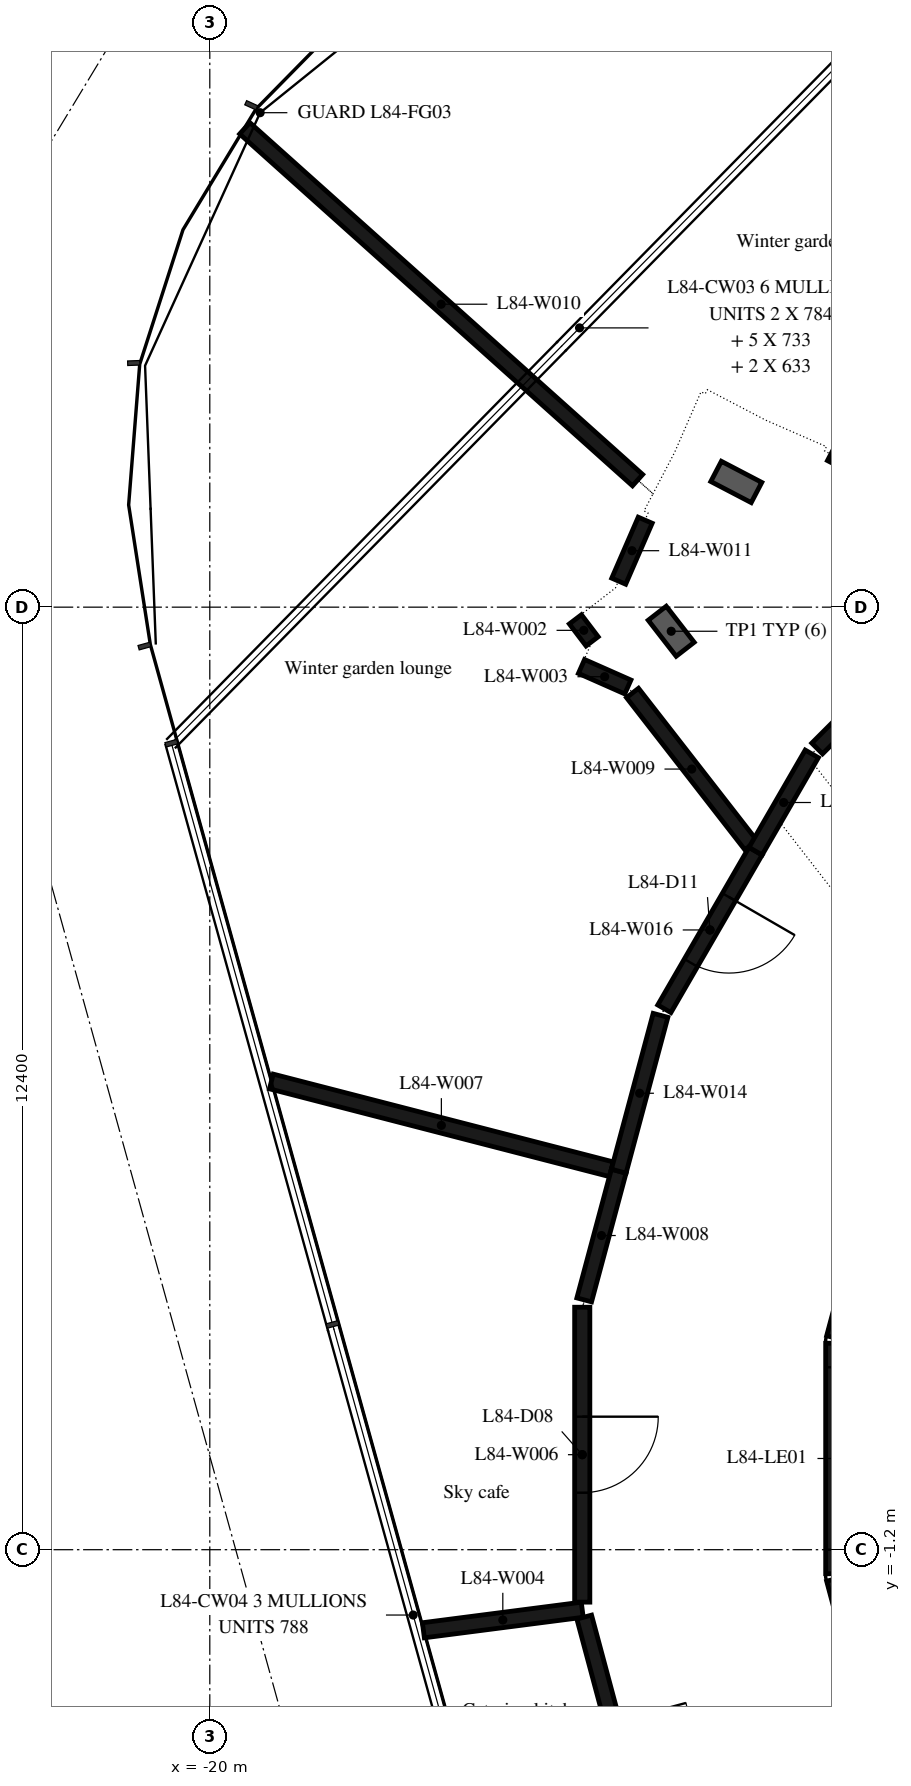
"""IFC4 building model, lengths in metres.
Left out: names, types, materials, properties, quantities, classifications, styles, units other than length and angle.
Written with IfcOpenShell. Run it as: python <this file> out.ifc"""

import sys

from ifc_helpers import new_model, si_unit, direction, frame, frame_2d, origin, place, context, subcontext, project, spatial, rectangle, extrude, element, fill, save


model = new_model("IFC4")
c1 = context("Model", 3, precision=1e-05, world=origin(), true_north=direction((0.0, 1.0)))
c2 = subcontext(c1, "Body", "Model", "MODEL_VIEW")
j1 = project(units=[si_unit("LENGTHUNIT", "METRE"), si_unit("PLANEANGLEUNIT", "RADIAN")], contexts=[c1])
p1 = place(None, origin())
s1 = spatial("IfcSite", under=j1, at=p1, CompositionType="ELEMENT")
p2 = place(p1, origin())
s2 = spatial("IfcBuilding", under=s1, at=p2, CompositionType="ELEMENT")
p3 = place(p2, frame((0.0, 0.0, 326.2)))
s3 = spatial("IfcBuildingStorey", under=s2, at=p3, CompositionType="ELEMENT", Elevation=326.2)
p4 = place(p3, frame((-10.858, 4.479, 0.0), z_axis=(0.0, 0.0, 1.0), x_axis=(-0.258734743916, -0.965948410781, 0.0)))
e1 = element("IfcWall", 1, at=p4, inside=s3, PredefinedType="SHEAR", context=c2, shape_type="SweptSolid", body=[
    extrude(rectangle(XDim=3.033, YDim=0.5, at=frame_2d((1.516, 0.0))), origin(), (0.0, 0.0, 1.0), 6.35),
])
p5 = place(p3, frame((-11.647, 1.516, 0.0), z_axis=(0.0, 0.0, 1.0), x_axis=(0.0, -1.0, 0.0)))
e2 = element("IfcWall", 2, at=p5, inside=s3, PredefinedType="SHEAR", context=c2, shape_type="SweptSolid", body=[
    extrude(rectangle(XDim=3.033, YDim=0.5, at=frame_2d((1.516, 0.0))), origin(), (0.0, 0.0, 1.0), 6.35),
])
p6 = place(p5, frame((0.316, 0.0, 0.0)))
e3 = element("IfcOpeningElement", 3, at=p6, cuts=e2, PredefinedType="OPENING", context=c2, shape_type="SweptSolid", body=[
    extrude(rectangle(XDim=2.4, YDim=2.1, at=frame_2d((1.2, 1.05))), frame((0.0, 0.26, 0.0), z_axis=(0.0, -1.0, 0.0), x_axis=(1.0, 0.0, 0.0)), (0.0, 0.0, 1.0), 0.52),
])
p7 = place(p3, frame((-11.643, -1.55, 0.0), z_axis=(0.0, 0.0, 1.0), x_axis=(0.258734743916, -0.965948410781, 0.0)))
e4 = element("IfcWall", 4, at=p7, inside=s3, PredefinedType="SHEAR", context=c2, shape_type="SweptSolid", body=[
    extrude(rectangle(XDim=3.033, YDim=0.5, at=frame_2d((1.516, 0.0))), origin(), (0.0, 0.0, 1.0), 6.35),
])
p8 = place(p7, frame((1.066, 0.0, 0.0)))
e5 = element("IfcOpeningElement", 5, at=p8, cuts=e4, PredefinedType="OPENING", context=c2, shape_type="SweptSolid", body=[
    extrude(rectangle(XDim=0.9, YDim=2.1, at=frame_2d((0.45, 1.05))), frame((0.0, 0.26, 0.0), z_axis=(0.0, -1.0, 0.0), x_axis=(1.0, 0.0, 0.0)), (0.0, 0.0, 1.0), 0.52),
])
p9 = place(p3, frame((-15.19, 11.04, 0.0), z_axis=(0.0, 0.0, 1.0), x_axis=(0.604283722932, -0.796769215143, 0.0)))
e6 = element("IfcWall", 6, at=p9, inside=s3, PredefinedType="PARTITIONING", context=c2, shape_type="SweptSolid", body=[
    extrude(rectangle(XDim=0.364, YDim=0.2, at=frame_2d((0.182, 0.0))), origin(), (0.0, 0.0, 1.0), 6.35),
])
p10 = place(p3, frame((-15.11, 10.42, 0.0), z_axis=(0.0, 0.0, 1.0), x_axis=(0.914444201394, -0.404711999497, 0.0)))
e7 = element("IfcWall", 7, at=p10, inside=s3, PredefinedType="PARTITIONING", context=c2, shape_type="SweptSolid", body=[
    extrude(rectangle(XDim=0.667, YDim=0.2, at=frame_2d((0.333, 0.0))), origin(), (0.0, 0.0, 1.0), 6.35),
])
p11 = place(p3, frame((-15.1, -1.99, 0.0), z_axis=(0.0, 0.0, 1.0), x_axis=(-0.991756032237, -0.128140440614, 0.0)))
e8 = element("IfcWall", 8, at=p11, inside=s3, PredefinedType="PARTITIONING", context=c2, shape_type="SweptSolid", body=[
    extrude(rectangle(XDim=2.107, YDim=0.2, at=frame_2d((1.054, 0.0))), origin(), (0.0, 0.0, 1.0), 6.35),
])
p12 = place(p3, frame((-15.074, -2.087, 0.0), z_axis=(0.0, 0.0, 1.0), x_axis=(0.259026804199, -0.965870133458, 0.0)))
e9 = element("IfcWall", 9, at=p12, inside=s3, PredefinedType="PARTITIONING", context=c2, shape_type="SweptSolid", body=[
    extrude(rectangle(XDim=3.876, YDim=0.2, at=frame_2d((1.938, 0.0))), origin(), (0.0, 0.0, 1.0), 6.35),
])
p13 = place(p12, frame((1.438, 0.0, 0.0)))
e10 = element("IfcOpeningElement", 10, at=p13, cuts=e9, PredefinedType="OPENING", context=c2, shape_type="SweptSolid", body=[
    extrude(rectangle(XDim=1.0, YDim=2.1, at=frame_2d((0.5, 1.05))), frame((0.0, 0.11, 0.0), z_axis=(0.0, -1.0, 0.0), x_axis=(1.0, 0.0, 0.0)), (0.0, 0.0, 1.0), 0.22),
])
p14 = place(p3, frame((-15.1, 1.99, 0.0), z_axis=(0.0, 0.0, 1.0), x_axis=(0.0, -1.0, 0.0)))
e11 = element("IfcWall", 11, at=p14, inside=s3, PredefinedType="PARTITIONING", context=c2, shape_type="SweptSolid", body=[
    extrude(rectangle(XDim=3.88, YDim=0.2, at=frame_2d((1.94, 0.0))), origin(), (0.0, 0.0, 1.0), 6.35),
])
p15 = place(p14, frame((1.44, 0.0, 0.0)))
e12 = element("IfcOpeningElement", 12, at=p15, cuts=e11, PredefinedType="OPENING", context=c2, shape_type="SweptSolid", body=[
    extrude(rectangle(XDim=1.0, YDim=2.1, at=frame_2d((0.5, 1.05))), frame((0.0, 0.11, 0.0), z_axis=(0.0, -1.0, 0.0), x_axis=(1.0, 0.0, 0.0)), (0.0, 0.0, 1.0), 0.22),
])
p16 = place(p3, frame((-14.717, 3.805, 0.0), z_axis=(0.0, 0.0, 1.0), x_axis=(-0.968242255447, 0.250013869148, 0.0)))
e13 = element("IfcWall", 13, at=p16, inside=s3, PredefinedType="PARTITIONING", context=c2, shape_type="SweptSolid", body=[
    extrude(rectangle(XDim=4.62, YDim=0.2, at=frame_2d((2.31, 0.0))), origin(), (0.0, 0.0, 1.0), 6.35),
])
p17 = place(p3, frame((-14.62, 3.78, 0.0), z_axis=(0.0, 0.0, 1.0), x_axis=(-0.259014501827, -0.965873432621, 0.0)))
e14 = element("IfcWall", 14, at=p17, inside=s3, PredefinedType="PARTITIONING", context=c2, shape_type="SweptSolid", body=[
    extrude(rectangle(XDim=1.753, YDim=0.2, at=frame_2d((0.876, 0.0))), origin(), (0.0, 0.0, 1.0), 6.35),
])
p18 = place(p3, frame((-14.439, 10.071, 0.0), z_axis=(0.0, 0.0, 1.0), x_axis=(0.613967266513, -0.789331486545, 0.0)))
e15 = element("IfcWall", 15, at=p18, inside=s3, PredefinedType="PARTITIONING", context=c2, shape_type="SweptSolid", body=[
    extrude(rectangle(XDim=2.537, YDim=0.2, at=frame_2d((1.268, 0.0))), origin(), (0.0, 0.0, 1.0), 6.35),
])
p19 = place(p3, frame((-14.372, 12.871, 0.0), z_axis=(0.0, 0.0, 1.0), x_axis=(-0.744887799674, 0.667189752542, 0.0)))
e16 = element("IfcWall", 16, at=p19, inside=s3, PredefinedType="PARTITIONING", context=c2, shape_type="SweptSolid", body=[
    extrude(rectangle(XDim=6.938, YDim=0.2, at=frame_2d((3.469, 0.0))), origin(), (0.0, 0.0, 1.0), 6.35),
])
p20 = place(p3, frame((-14.272, 12.344, 0.0), z_axis=(0.0, 0.0, 1.0), x_axis=(-0.39832800457, -0.91724304346, 0.0)))
e17 = element("IfcWall", 17, at=p20, inside=s3, PredefinedType="PARTITIONING", context=c2, shape_type="SweptSolid", body=[
    extrude(rectangle(XDim=0.875, YDim=0.2, at=frame_2d((0.437, 0.0))), origin(), (0.0, 0.0, 1.0), 6.35),
])
p21 = place(p3, frame((-14.07, 5.83, 0.0), z_axis=(0.0, 0.0, 1.0), x_axis=(-0.259144268261, -0.965838624319, 0.0)))
e18 = element("IfcWall", 18, at=p21, inside=s3, PredefinedType="PARTITIONING", context=c2, shape_type="SweptSolid", body=[
    extrude(rectangle(XDim=2.123, YDim=0.2, at=frame_2d((1.061, 0.0))), origin(), (0.0, 0.0, 1.0), 6.35),
])
p22 = place(p3, frame((-12.82, 7.99, 0.0), z_axis=(0.0, 0.0, 1.0), x_axis=(-0.50088361041, -0.865514649687, 0.0)))
e19 = element("IfcWall", 19, at=p22, inside=s3, PredefinedType="PARTITIONING", context=c2, shape_type="SweptSolid", body=[
    extrude(rectangle(XDim=2.396, YDim=0.2, at=frame_2d((1.198, 0.0))), origin(), (0.0, 0.0, 1.0), 6.35),
])
p23 = place(p22, frame((0.698, 0.0, 0.0)))
e20 = element("IfcOpeningElement", 20, at=p23, cuts=e19, PredefinedType="OPENING", context=c2, shape_type="SweptSolid", body=[
    extrude(rectangle(XDim=1.0, YDim=2.1, at=frame_2d((0.5, 1.05))), frame((0.0, 0.11, 0.0), z_axis=(0.0, -1.0, 0.0), x_axis=(1.0, 0.0, 0.0)), (0.0, 0.0, 1.0), 0.22),
])
p24 = place(p3, frame((-12.08, 9.27, 0.0), z_axis=(0.0, 0.0, 1.0), x_axis=(-0.500489412975, -0.865742656625, 0.0)))
e21 = element("IfcWall", 21, at=p24, inside=s3, PredefinedType="PARTITIONING", context=c2, shape_type="SweptSolid", body=[
    extrude(rectangle(XDim=1.479, YDim=0.2, at=frame_2d((0.739, 0.0))), origin(), (0.0, 0.0, 1.0), 6.35),
])
p25 = place(p3, frame((-12.009, 9.341, 0.0), z_axis=(0.0, 0.0, 1.0), x_axis=(0.707139861432, 0.707073699394, 0.0)))
e22 = element("IfcWall", 22, at=p25, inside=s3, PredefinedType="PARTITIONING", context=c2, shape_type="SweptSolid", body=[
    extrude(rectangle(XDim=3.69, YDim=0.2, at=frame_2d((1.845, 0.0))), origin(), (0.0, 0.0, 1.0), 6.35),
])
p26 = place(p3, frame((-9.489, 11.996, 0.0), z_axis=(0.0, 0.0, 1.0), x_axis=(-0.886536984928, 0.462657729163, 0.0)))
e23 = element("IfcWall", 23, at=p26, inside=s3, PredefinedType="PARTITIONING", context=c2, shape_type="SweptSolid", body=[
    extrude(rectangle(XDim=2.638, YDim=0.2, at=frame_2d((1.319, 0.0))), origin(), (0.0, 0.0, 1.0), 6.35),
])
p27 = place(p15, origin())
e24 = element("IfcDoor", 24, at=p27, inside=s3, OperationType="SINGLE_SWING_LEFT", PredefinedType="DOOR", context=c2, shape_type="SweptSolid", body=[
    extrude(rectangle(XDim=1.0, YDim=2.1, at=frame_2d((0.5, 1.05))), frame((0.0, 0.025, 0.0), z_axis=(0.0, -1.0, 0.0), x_axis=(1.0, 0.0, 0.0)), (0.0, 0.0, 1.0), 0.05),
])
fill(e12, e24)
p28 = place(p23, origin())
e25 = element("IfcDoor", 25, at=p28, inside=s3, OperationType="SINGLE_SWING_LEFT", PredefinedType="DOOR", context=c2, shape_type="SweptSolid", body=[
    extrude(rectangle(XDim=1.0, YDim=2.1, at=frame_2d((0.5, 1.05))), frame((0.0, 0.025, 0.0), z_axis=(0.0, -1.0, 0.0), x_axis=(1.0, 0.0, 0.0)), (0.0, 0.0, 1.0), 0.05),
])
fill(e20, e25)
save(model, sys.argv[1])
